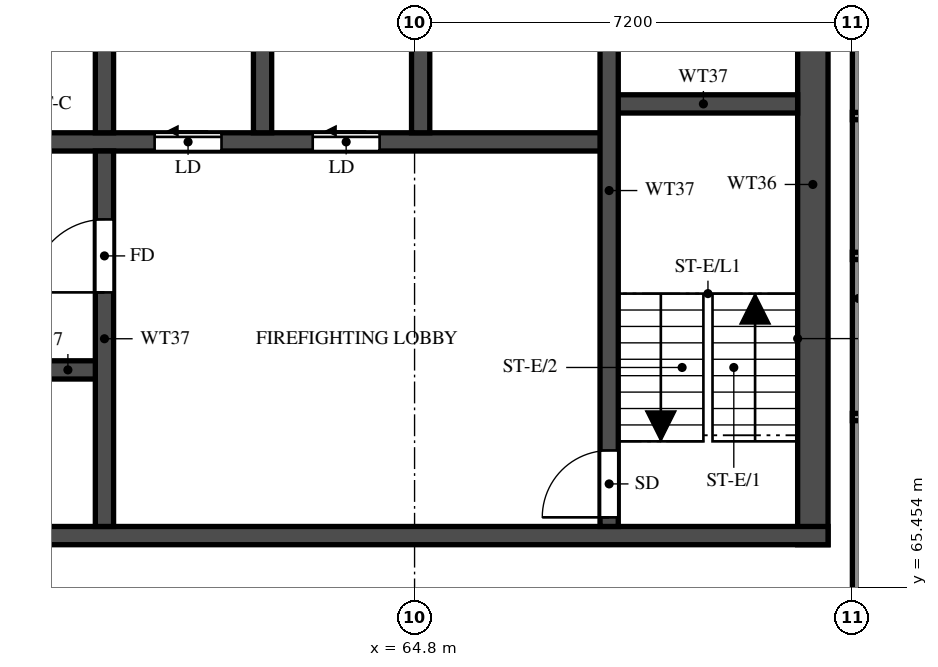
"""IFC4 building model, lengths in metres.
Left out: names, types, materials, properties, quantities, classifications, styles, units other than length and angle.
Written with IfcOpenShell. Run it as: python <this file> out.ifc"""

import sys

from ifc_helpers import new_model, si_unit, direction, frame, frame_2d, origin, place, context, subcontext, project, spatial, rectangle, extrude, element, fill, save


model = new_model("IFC4")
c1 = context("Model", 3, precision=1e-05, world=origin(), true_north=direction((0.0, 1.0)))
c2 = subcontext(c1, "Body", "Model", "MODEL_VIEW")
j1 = project(units=[si_unit("LENGTHUNIT", "METRE"), si_unit("PLANEANGLEUNIT", "RADIAN")], contexts=[c1])
p1 = place(None, origin())
s1 = spatial("IfcSite", under=j1, at=p1, CompositionType="ELEMENT")
p2 = place(p1, origin())
s2 = spatial("IfcBuilding", under=s1, at=p2, CompositionType="ELEMENT")
p3 = place(p2, frame((0.0, 0.0, 211.5)))
s3 = spatial("IfcBuildingStorey", under=s2, at=p3, CompositionType="ELEMENT", Elevation=211.5)
p4 = place(p3, frame((71.35, 66.15, 0.0), z_axis=(0.0, 0.0, 1.0), x_axis=(0.0, 1.0, 0.0)))
e1 = element("IfcWall", 1, at=p4, inside=s3, PredefinedType="SHEAR", context=c2, shape_type="SweptSolid", body=[
    extrude(rectangle(XDim=11.85, YDim=0.5, at=frame_2d((5.925, 0.0))), origin(), (0.0, 0.0, 1.0), 3.22),
])
p5 = place(p3, frame((29.2, 66.3, 0.0), z_axis=(0.0, 0.0, 1.0), x_axis=(1.0, 0.0, 0.0)))
e2 = element("IfcWall", 2, at=p5, inside=s3, PredefinedType="SHEAR", context=c2, shape_type="SweptSolid", body=[
    extrude(rectangle(XDim=42.4, YDim=0.3, at=frame_2d((21.2, 0.0))), origin(), (0.0, 0.0, 1.0), 3.22),
])
p6 = place(p5, frame((1.425, 0.0, 0.0)))
e3 = element("IfcOpeningElement", 3, at=p6, cuts=e2, PredefinedType="OPENING", context=c2, shape_type="SweptSolid", body=[
    extrude(rectangle(XDim=1.1, YDim=2.1, at=frame_2d((0.55, 1.05))), frame((0.0, 0.16, 0.0), z_axis=(0.0, -1.0, 0.0), x_axis=(1.0, 0.0, 0.0)), (0.0, 0.0, 1.0), 0.32),
])
p7 = place(p5, frame((4.2, 0.0, 0.0)))
e4 = element("IfcOpeningElement", 4, at=p7, cuts=e2, PredefinedType="OPENING", context=c2, shape_type="SweptSolid", body=[
    extrude(rectangle(XDim=1.8, YDim=2.1, at=frame_2d((0.9, 1.05))), frame((0.0, 0.16, 0.0), z_axis=(0.0, -1.0, 0.0), x_axis=(1.0, 0.0, 0.0)), (0.0, 0.0, 1.0), 0.32),
])
p8 = place(p3, frame((35.65, 69.025, 0.0), z_axis=(0.0, 0.0, 1.0), x_axis=(1.0, 0.0, 0.0)))
e5 = element("IfcWall", 5, at=p8, inside=s3, PredefinedType="SHEAR", context=c2, shape_type="SweptSolid", body=[
    extrude(rectangle(XDim=24.05, YDim=0.3, at=frame_2d((12.025, 0.0))), origin(), (0.0, 0.0, 1.0), 3.22),
])
p9 = place(p8, frame((0.975, 0.0, 0.0)))
e6 = element("IfcOpeningElement", 6, at=p9, cuts=e5, PredefinedType="OPENING", context=c2, shape_type="SweptSolid", body=[
    extrude(rectangle(XDim=1.1, YDim=2.1, at=frame_2d((0.55, 1.05))), frame((0.0, 0.16, 0.0), z_axis=(0.0, -1.0, 0.0), x_axis=(1.0, 0.0, 0.0)), (0.0, 0.0, 1.0), 0.32),
])
p10 = place(p8, frame((3.725, 0.0, 0.0)))
e7 = element("IfcOpeningElement", 7, at=p10, cuts=e5, PredefinedType="OPENING", context=c2, shape_type="SweptSolid", body=[
    extrude(rectangle(XDim=1.1, YDim=2.1, at=frame_2d((0.55, 1.05))), frame((0.0, 0.16, 0.0), z_axis=(0.0, -1.0, 0.0), x_axis=(1.0, 0.0, 0.0)), (0.0, 0.0, 1.0), 0.32),
])
p11 = place(p8, frame((6.475, 0.0, 0.0)))
e8 = element("IfcOpeningElement", 8, at=p11, cuts=e5, PredefinedType="OPENING", context=c2, shape_type="SweptSolid", body=[
    extrude(rectangle(XDim=1.1, YDim=2.1, at=frame_2d((0.55, 1.05))), frame((0.0, 0.16, 0.0), z_axis=(0.0, -1.0, 0.0), x_axis=(1.0, 0.0, 0.0)), (0.0, 0.0, 1.0), 0.32),
])
p12 = place(p8, frame((9.225, 0.0, 0.0)))
e9 = element("IfcOpeningElement", 9, at=p12, cuts=e5, PredefinedType="OPENING", context=c2, shape_type="SweptSolid", body=[
    extrude(rectangle(XDim=1.1, YDim=2.1, at=frame_2d((0.55, 1.05))), frame((0.0, 0.16, 0.0), z_axis=(0.0, -1.0, 0.0), x_axis=(1.0, 0.0, 0.0)), (0.0, 0.0, 1.0), 0.32),
])
p13 = place(p8, frame((11.975, 0.0, 0.0)))
e10 = element("IfcOpeningElement", 10, at=p13, cuts=e5, PredefinedType="OPENING", context=c2, shape_type="SweptSolid", body=[
    extrude(rectangle(XDim=1.1, YDim=2.1, at=frame_2d((0.55, 1.05))), frame((0.0, 0.16, 0.0), z_axis=(0.0, -1.0, 0.0), x_axis=(1.0, 0.0, 0.0)), (0.0, 0.0, 1.0), 0.32),
])
p14 = place(p8, frame((14.725, 0.0, 0.0)))
e11 = element("IfcOpeningElement", 11, at=p14, cuts=e5, PredefinedType="OPENING", context=c2, shape_type="SweptSolid", body=[
    extrude(rectangle(XDim=1.1, YDim=2.1, at=frame_2d((0.55, 1.05))), frame((0.0, 0.16, 0.0), z_axis=(0.0, -1.0, 0.0), x_axis=(1.0, 0.0, 0.0)), (0.0, 0.0, 1.0), 0.32),
])
p15 = place(p8, frame((17.6, 0.0, 0.0)))
e12 = element("IfcOpeningElement", 12, at=p15, cuts=e5, PredefinedType="OPENING", context=c2, shape_type="SweptSolid", body=[
    extrude(rectangle(XDim=1.1, YDim=2.1, at=frame_2d((0.55, 1.05))), frame((0.0, 0.16, 0.0), z_axis=(0.0, -1.0, 0.0), x_axis=(1.0, 0.0, 0.0)), (0.0, 0.0, 1.0), 0.32),
])
p16 = place(p8, frame((20.6, 0.0, 0.0)))
e13 = element("IfcOpeningElement", 13, at=p16, cuts=e5, PredefinedType="OPENING", context=c2, shape_type="SweptSolid", body=[
    extrude(rectangle(XDim=1.1, YDim=2.1, at=frame_2d((0.55, 1.05))), frame((0.0, 0.16, 0.0), z_axis=(0.0, -1.0, 0.0), x_axis=(1.0, 0.0, 0.0)), (0.0, 0.0, 1.0), 0.32),
])
p17 = place(p3, frame((32.8, 72.775, 0.0), z_axis=(0.0, 0.0, 1.0), x_axis=(1.0, 0.0, 0.0)))
e14 = element("IfcWall", 14, at=p17, inside=s3, PredefinedType="SHEAR", context=c2, shape_type="SweptSolid", body=[
    extrude(rectangle(XDim=35.2, YDim=0.3, at=frame_2d((17.6, 0.0))), origin(), (0.0, 0.0, 1.0), 3.22),
])
p18 = place(p17, frame((19.8, 0.0, 0.0)))
e15 = element("IfcOpeningElement", 15, at=p18, cuts=e14, PredefinedType="OPENING", context=c2, shape_type="SweptSolid", body=[
    extrude(rectangle(XDim=1.1, YDim=2.1, at=frame_2d((0.55, 1.05))), frame((0.0, 0.16, 0.0), z_axis=(0.0, -1.0, 0.0), x_axis=(1.0, 0.0, 0.0)), (0.0, 0.0, 1.0), 0.32),
])
p19 = place(p17, frame((27.725, 0.0, 0.0)))
e16 = element("IfcOpeningElement", 16, at=p19, cuts=e14, PredefinedType="OPENING", context=c2, shape_type="SweptSolid", body=[
    extrude(rectangle(XDim=1.1, YDim=2.1, at=frame_2d((0.55, 1.05))), frame((0.0, 0.16, 0.0), z_axis=(0.0, -1.0, 0.0), x_axis=(1.0, 0.0, 0.0)), (0.0, 0.0, 1.0), 0.32),
])
p20 = place(p17, frame((30.325, 0.0, 0.0)))
e17 = element("IfcOpeningElement", 17, at=p20, cuts=e14, PredefinedType="OPENING", context=c2, shape_type="SweptSolid", body=[
    extrude(rectangle(XDim=1.1, YDim=2.1, at=frame_2d((0.55, 1.05))), frame((0.0, 0.16, 0.0), z_axis=(0.0, -1.0, 0.0), x_axis=(1.0, 0.0, 0.0)), (0.0, 0.0, 1.0), 0.32),
])
p21 = place(p17, frame((3.825, 0.0, 0.0)))
e18 = element("IfcOpeningElement", 18, at=p21, cuts=e14, PredefinedType="OPENING", context=c2, shape_type="SweptSolid", body=[
    extrude(rectangle(XDim=1.1, YDim=2.1, at=frame_2d((0.55, 1.05))), frame((0.0, 0.16, 0.0), z_axis=(0.0, -1.0, 0.0), x_axis=(1.0, 0.0, 0.0)), (0.0, 0.0, 1.0), 0.32),
])
p22 = place(p17, frame((6.575, 0.0, 0.0)))
e19 = element("IfcOpeningElement", 19, at=p22, cuts=e14, PredefinedType="OPENING", context=c2, shape_type="SweptSolid", body=[
    extrude(rectangle(XDim=1.1, YDim=2.1, at=frame_2d((0.55, 1.05))), frame((0.0, 0.16, 0.0), z_axis=(0.0, -1.0, 0.0), x_axis=(1.0, 0.0, 0.0)), (0.0, 0.0, 1.0), 0.32),
])
p23 = place(p17, frame((9.325, 0.0, 0.0)))
e20 = element("IfcOpeningElement", 20, at=p23, cuts=e14, PredefinedType="OPENING", context=c2, shape_type="SweptSolid", body=[
    extrude(rectangle(XDim=1.1, YDim=2.1, at=frame_2d((0.55, 1.05))), frame((0.0, 0.16, 0.0), z_axis=(0.0, -1.0, 0.0), x_axis=(1.0, 0.0, 0.0)), (0.0, 0.0, 1.0), 0.32),
])
p24 = place(p17, frame((12.075, 0.0, 0.0)))
e21 = element("IfcOpeningElement", 21, at=p24, cuts=e14, PredefinedType="OPENING", context=c2, shape_type="SweptSolid", body=[
    extrude(rectangle(XDim=1.1, YDim=2.1, at=frame_2d((0.55, 1.05))), frame((0.0, 0.16, 0.0), z_axis=(0.0, -1.0, 0.0), x_axis=(1.0, 0.0, 0.0)), (0.0, 0.0, 1.0), 0.32),
])
p25 = place(p17, frame((14.825, 0.0, 0.0)))
e22 = element("IfcOpeningElement", 22, at=p25, cuts=e14, PredefinedType="OPENING", context=c2, shape_type="SweptSolid", body=[
    extrude(rectangle(XDim=1.1, YDim=2.1, at=frame_2d((0.55, 1.05))), frame((0.0, 0.16, 0.0), z_axis=(0.0, -1.0, 0.0), x_axis=(1.0, 0.0, 0.0)), (0.0, 0.0, 1.0), 0.32),
])
p26 = place(p17, frame((17.575, 0.0, 0.0)))
e23 = element("IfcOpeningElement", 23, at=p26, cuts=e14, PredefinedType="OPENING", context=c2, shape_type="SweptSolid", body=[
    extrude(rectangle(XDim=1.1, YDim=2.1, at=frame_2d((0.55, 1.05))), frame((0.0, 0.16, 0.0), z_axis=(0.0, -1.0, 0.0), x_axis=(1.0, 0.0, 0.0)), (0.0, 0.0, 1.0), 0.32),
])
p27 = place(p17, frame((0.95, 0.0, 0.0)))
e24 = element("IfcOpeningElement", 24, at=p27, cuts=e14, PredefinedType="OPENING", context=c2, shape_type="SweptSolid", body=[
    extrude(rectangle(XDim=1.1, YDim=2.1, at=frame_2d((0.55, 1.05))), frame((0.0, 0.16, 0.0), z_axis=(0.0, -1.0, 0.0), x_axis=(1.0, 0.0, 0.0)), (0.0, 0.0, 1.0), 0.32),
])
p28 = place(p3, frame((68.0, 73.4, 0.0), z_axis=(0.0, 0.0, 1.0), x_axis=(1.0, 0.0, 0.0)))
e25 = element("IfcWall", 25, at=p28, inside=s3, PredefinedType="SHEAR", context=c2, shape_type="SweptSolid", body=[
    extrude(rectangle(XDim=3.1, YDim=0.3, at=frame_2d((1.55, 0.0))), origin(), (0.0, 0.0, 1.0), 3.22),
])
p29 = place(p3, frame((68.0, 66.45, 0.0), z_axis=(0.0, 0.0, 1.0), x_axis=(0.0, 1.0, 0.0)))
e26 = element("IfcWall", 26, at=p29, inside=s3, PredefinedType="SHEAR", context=c2, shape_type="SweptSolid", body=[
    extrude(rectangle(XDim=11.05, YDim=0.3, at=frame_2d((5.525, 0.0))), origin(), (0.0, 0.0, 1.0), 3.22),
])
p30 = place(p29, frame((0.15, 0.0, 0.0)))
e27 = element("IfcOpeningElement", 27, at=p30, cuts=e26, PredefinedType="OPENING", context=c2, shape_type="SweptSolid", body=[
    extrude(rectangle(XDim=1.1, YDim=2.1, at=frame_2d((0.55, 1.05))), frame((0.0, 0.16, 0.0), z_axis=(0.0, -1.0, 0.0), x_axis=(1.0, 0.0, 0.0)), (0.0, 0.0, 1.0), 0.32),
])
p31 = place(p3, frame((59.7, 66.45, 0.0), z_axis=(0.0, 0.0, 1.0), x_axis=(0.0, 1.0, 0.0)))
e28 = element("IfcWall", 28, at=p31, inside=s3, PredefinedType="SHEAR", context=c2, shape_type="SweptSolid", body=[
    extrude(rectangle(XDim=6.175, YDim=0.3, at=frame_2d((3.087, 0.0))), origin(), (0.0, 0.0, 1.0), 3.22),
])
p32 = place(p31, frame((3.85, 0.0, 0.0)))
e29 = element("IfcOpeningElement", 29, at=p32, cuts=e28, PredefinedType="OPENING", context=c2, shape_type="SweptSolid", body=[
    extrude(rectangle(XDim=1.2, YDim=2.1, at=frame_2d((0.6, 1.05))), frame((0.0, 0.16, 0.0), z_axis=(0.0, -1.0, 0.0), x_axis=(1.0, 0.0, 0.0)), (0.0, 0.0, 1.0), 0.32),
])
for number, where, z_axis, x_axis in (
    (30, (59.7, 72.925, 0.0), (0.0, 0.0, 1.0), (0.0, 1.0, 0.0)),
    (31, (62.3, 72.925, 0.0), (0.0, 0.0, 1.0), (0.0, 1.0, 0.0)),
    (32, (64.9, 72.925, 0.0), (0.0, 0.0, 1.0), (0.0, 1.0, 0.0)),
):
    element("IfcWall", number, at=place(p3, frame(where, z_axis=z_axis, x_axis=x_axis)), inside=s3, PredefinedType="SHEAR", context=c2, shape_type="SweptSolid", body=[
        extrude(rectangle(XDim=2.95, YDim=0.3, at=frame_2d((1.475, 0.0))), origin(), (0.0, 0.0, 1.0), 3.22),
    ])
p33 = place(p3, frame((72.1, 62.4, 0.0), z_axis=(0.0, 0.0, 1.0), x_axis=(0.0, 1.0, 0.0)))
e33 = element("IfcWall", 33, at=p33, inside=s3, PredefinedType="SOLIDWALL", context=c2, shape_type="SweptSolid", body=[
    extrude(rectangle(XDim=15.6, YDim=0.2, at=frame_2d((7.8, 0.0))), origin(), (0.0, 0.0, 1.0), 3.22),
])
for number, where, z_axis, x_axis in (
    (34, (72.0, 68.25, 0.0), (0.0, 0.0, 1.0), (1.0, 0.0, 0.0)),
    (35, (72.0, 70.9, 0.0), (0.0, 0.0, 1.0), (1.0, 0.0, 0.0)),
):
    element("IfcWall", number, at=place(p3, frame(where, z_axis=z_axis, x_axis=x_axis)), inside=s3, PredefinedType="PARTITIONING", context=c2, shape_type="SweptSolid", body=[
        extrude(rectangle(XDim=3.5, YDim=0.12, at=frame_2d((1.75, 0.0))), origin(), (0.0, 0.0, 1.0), 3.22),
    ])
p34 = place(p3, frame((72.0, 73.2, 0.0), z_axis=(0.0, 0.0, 1.0), x_axis=(1.0, 0.0, 0.0)))
e36 = element("IfcWall", 36, at=p34, inside=s3, PredefinedType="PARTITIONING", context=c2, shape_type="SweptSolid", body=[
    extrude(rectangle(XDim=10.275, YDim=0.12, at=frame_2d((5.137, 0.0))), origin(), (0.0, 0.0, 1.0), 2.32),
])
p35 = place(p34, frame((4.1, 0.0, 0.0)))
e37 = element("IfcOpeningElement", 37, at=p35, cuts=e36, PredefinedType="OPENING", context=c2, shape_type="SweptSolid", body=[
    extrude(rectangle(XDim=0.9, YDim=2.1, at=frame_2d((0.45, 1.05))), frame((0.0, 0.07, 0.0), z_axis=(0.0, -1.0, 0.0), x_axis=(1.0, 0.0, 0.0)), (0.0, 0.0, 1.0), 0.14),
])
p36 = place(p30, origin())
e38 = element("IfcDoor", 38, at=p36, inside=s3, OperationType="SINGLE_SWING_RIGHT", PredefinedType="DOOR", context=c2, shape_type="SweptSolid", body=[
    extrude(rectangle(XDim=1.1, YDim=2.1, at=frame_2d((0.55, 1.05))), frame((0.0, 0.025, 0.0), z_axis=(0.0, -1.0, 0.0), x_axis=(1.0, 0.0, 0.0)), (0.0, 0.0, 1.0), 0.05),
])
fill(e27, e38)
p37 = place(p32, origin())
e39 = element("IfcDoor", 39, at=p37, inside=s3, OperationType="SINGLE_SWING_LEFT", PredefinedType="DOOR", context=c2, shape_type="SweptSolid", body=[
    extrude(rectangle(XDim=1.2, YDim=2.1, at=frame_2d((0.6, 1.05))), frame((0.0, 0.025, 0.0), z_axis=(0.0, -1.0, 0.0), x_axis=(1.0, 0.0, 0.0)), (0.0, 0.0, 1.0), 0.05),
])
fill(e29, e39)
p38 = place(p19, origin())
e40 = element("IfcDoor", 40, at=p38, inside=s3, OperationType="SLIDING_TO_LEFT", PredefinedType="DOOR", context=c2, shape_type="SweptSolid", body=[
    extrude(rectangle(XDim=1.1, YDim=2.1, at=frame_2d((0.55, 1.05))), frame((0.0, 0.025, 0.0), z_axis=(0.0, -1.0, 0.0), x_axis=(1.0, 0.0, 0.0)), (0.0, 0.0, 1.0), 0.05),
])
fill(e16, e40)
p39 = place(p20, origin())
e41 = element("IfcDoor", 41, at=p39, inside=s3, OperationType="SLIDING_TO_LEFT", PredefinedType="DOOR", context=c2, shape_type="SweptSolid", body=[
    extrude(rectangle(XDim=1.1, YDim=2.1, at=frame_2d((0.55, 1.05))), frame((0.0, 0.025, 0.0), z_axis=(0.0, -1.0, 0.0), x_axis=(1.0, 0.0, 0.0)), (0.0, 0.0, 1.0), 0.05),
])
fill(e17, e41)
save(model, sys.argv[1])
